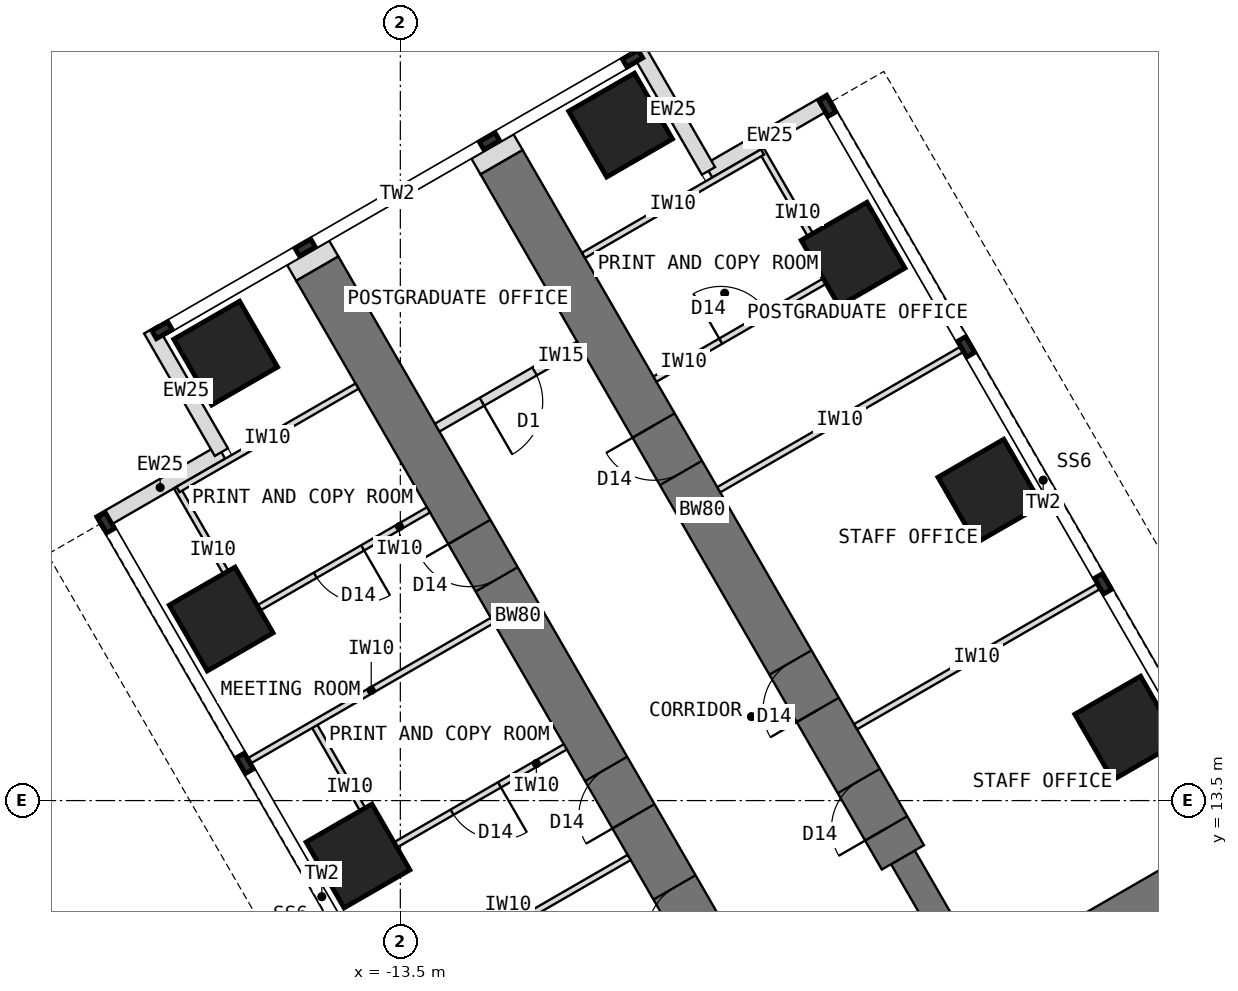
"""IFC4 building model, lengths in metres.
Left out: names, types, materials, properties, quantities, classifications, styles, units other than length and angle.
Written with IfcOpenShell. Run it as: python <this file> out.ifc"""

import sys

from ifc_helpers import new_model, si_unit, direction, frame, frame_2d, origin, origin_2d, place, context, subcontext, project, spatial, rectangle, extrude, element, fill, save


model = new_model("IFC4")
c1 = context("Model", 3, precision=1e-05, world=origin(), true_north=direction((0.0, 1.0)))
c2 = subcontext(c1, "Body", "Model", "MODEL_VIEW")
j1 = project(units=[si_unit("LENGTHUNIT", "METRE"), si_unit("PLANEANGLEUNIT", "RADIAN")], contexts=[c1])
p1 = place(None, origin())
s1 = spatial("IfcSite", under=j1, at=p1, CompositionType="ELEMENT")
p2 = place(p1, origin())
s2 = spatial("IfcBuilding", under=s1, at=p2, CompositionType="ELEMENT")
p3 = place(p2, frame((0.0, 0.0, 157.5)))
s3 = spatial("IfcBuildingStorey", under=s2, at=p3, CompositionType="ELEMENT", Elevation=157.5)
p4 = place(p3, frame((0.0, 12.596, 0.0), z_axis=(0.0, 0.0, 1.0), x_axis=(-0.866011268655, -0.500024481964, 0.0)))
e1 = element("IfcWall", 1, at=p4, inside=s3, PredefinedType="SHEAR", context=c2, shape_type="SweptSolid", body=[
    extrude(rectangle(XDim=4.548, YDim=0.6, at=frame_2d((2.274, 0.0))), origin(), (0.0, 0.0, 1.0), 4.0),
])
p5 = place(p3, frame((-8.266, 10.816, 0.0), z_axis=(0.0, 0.0, 1.0), x_axis=(-0.499996231654, 0.866027579429, 0.0)))
e2 = element("IfcWall", 2, at=p5, inside=s3, PredefinedType="SHEAR", context=c2, shape_type="SweptSolid", body=[
    extrude(rectangle(XDim=13.2, YDim=0.8, at=frame_2d((6.6, 0.0))), origin(), (0.0, 0.0, 1.0), 4.0),
])
p6 = place(p5, frame((0.55, 0.0, 0.0)))
e3 = element("IfcOpeningElement", 3, at=p6, cuts=e2, PredefinedType="OPENING", context=c2, shape_type="SweptSolid", body=[
    extrude(rectangle(XDim=0.9, YDim=2.1, at=frame_2d((0.45, 1.05))), frame((0.0, 0.41, 0.0), z_axis=(0.0, -1.0, 0.0), x_axis=(1.0, 0.0, 0.0)), (0.0, 0.0, 1.0), 0.82),
])
p7 = place(p5, frame((2.8, 0.0, 0.0)))
e4 = element("IfcOpeningElement", 4, at=p7, cuts=e2, PredefinedType="OPENING", context=c2, shape_type="SweptSolid", body=[
    extrude(rectangle(XDim=0.9, YDim=2.1, at=frame_2d((0.45, 1.05))), frame((0.0, 0.41, 0.0), z_axis=(0.0, -1.0, 0.0), x_axis=(1.0, 0.0, 0.0)), (0.0, 0.0, 1.0), 0.82),
])
p8 = place(p5, frame((7.3, 0.0, 0.0)))
e5 = element("IfcOpeningElement", 5, at=p8, cuts=e2, PredefinedType="OPENING", context=c2, shape_type="SweptSolid", body=[
    extrude(rectangle(XDim=0.9, YDim=2.1, at=frame_2d((0.45, 1.05))), frame((0.0, 0.41, 0.0), z_axis=(0.0, -1.0, 0.0), x_axis=(1.0, 0.0, 0.0)), (0.0, 0.0, 1.0), 0.82),
])
p9 = place(p3, frame((-3.939, 10.322, 0.0), z_axis=(0.0, 0.0, 1.0), x_axis=(-0.499918158782, 0.866072649678, 0.0)))
e6 = element("IfcWall", 6, at=p9, inside=s3, PredefinedType="SHEAR", context=c2, shape_type="SweptSolid", body=[
    extrude(rectangle(XDim=2.592, YDim=0.45, at=frame_2d((1.296, 0.0))), origin(), (0.0, 0.0, 1.0), 4.0),
])
p10 = place(p3, frame((-5.234, 12.566, 0.0), z_axis=(0.0, 0.0, 1.0), x_axis=(-0.500010103361, 0.866019570528, 0.0)))
e7 = element("IfcWall", 7, at=p10, inside=s3, PredefinedType="SHEAR", context=c2, shape_type="SweptSolid", body=[
    extrude(rectangle(XDim=13.2, YDim=0.8, at=frame_2d((6.6, 0.0))), origin(), (0.0, 0.0, 1.0), 4.0),
])
p11 = place(p10, frame((0.55, 0.0, 0.0)))
e8 = element("IfcOpeningElement", 8, at=p11, cuts=e7, PredefinedType="OPENING", context=c2, shape_type="SweptSolid", body=[
    extrude(rectangle(XDim=0.9, YDim=2.1, at=frame_2d((0.45, 1.05))), frame((0.0, 0.41, 0.0), z_axis=(0.0, -1.0, 0.0), x_axis=(1.0, 0.0, 0.0)), (0.0, 0.0, 1.0), 0.82),
])
p12 = place(p10, frame((2.8, 0.0, 0.0)))
e9 = element("IfcOpeningElement", 9, at=p12, cuts=e7, PredefinedType="OPENING", context=c2, shape_type="SweptSolid", body=[
    extrude(rectangle(XDim=0.9, YDim=2.1, at=frame_2d((0.45, 1.05))), frame((0.0, 0.41, 0.0), z_axis=(0.0, -1.0, 0.0), x_axis=(1.0, 0.0, 0.0)), (0.0, 0.0, 1.0), 0.82),
])
p13 = place(p10, frame((7.3, 0.0, 0.0)))
e10 = element("IfcOpeningElement", 10, at=p13, cuts=e7, PredefinedType="OPENING", context=c2, shape_type="SweptSolid", body=[
    extrude(rectangle(XDim=0.9, YDim=2.1, at=frame_2d((0.45, 1.05))), frame((0.0, 0.41, 0.0), z_axis=(0.0, -1.0, 0.0), x_axis=(1.0, 0.0, 0.0)), (0.0, 0.0, 1.0), 0.82),
])
for number, where, z_axis, x_axis in (
    (11, (-1.554, 14.691, 0.0), (0.0, 0.0, 1.0), (0.866, 0.5, 0.0)),
    (12, (-14.196, 12.588, 0.0), (0.0, 0.0, 1.0), (0.866, 0.5, 0.0)),
    (13, (-3.804, 18.588, 0.0), (0.0, 0.0, 1.0), (0.866, 0.5, 0.0)),
    (14, (-16.446, 16.486, 0.0), (0.0, 0.0, 1.0), (0.866, 0.5, 0.0)),
    (15, (-6.054, 22.486, 0.0), (0.0, 0.0, 1.0), (0.866, 0.5, 0.0)),
    (16, (-16.373, 20.858, 0.0), (0.0, 0.0, 1.0), (0.866, 0.5, 0.0)),
    (17, (-9.877, 24.608, 0.0), (0.0, 0.0, 1.0), (0.866, 0.5, 0.0)),
):
    element("IfcColumn", number, at=place(p3, frame(where, z_axis=z_axis, x_axis=x_axis)), inside=s3, PredefinedType="COLUMN", context=c2, shape_type="SweptSolid", body=[
        extrude(rectangle(XDim=1.25, YDim=1.25, at=origin_2d()), origin(), (0.0, 0.0, 1.0), 4.0),
    ])
for number, where, z_axis, x_axis in (
    (18, (-18.456, 18.067, 0.0), (0.0, 0.0, 1.0), (0.866, 0.5, 0.0)),
    (19, (-16.443, 19.23, 0.0), (0.0, 0.0, 1.0), (-0.5, 0.866, 0.0)),
    (20, (-6.419, 25.017, 0.0), (0.0, 0.0, 1.0), (-0.866, -0.5, 0.0)),
    (21, (-8.432, 23.855, 0.0), (0.0, 0.0, 1.0), (-0.5, 0.866, 0.0)),
):
    element("IfcWall", number, at=place(p3, frame(where, z_axis=z_axis, x_axis=x_axis)), inside=s3, PredefinedType="STANDARD", context=c2, shape_type="SweptSolid", body=[
        extrude(rectangle(XDim=2.325, YDim=0.25, at=frame_2d((1.163, 0.0))), origin(), (0.0, 0.0, 1.0), 3.8),
    ])
p14 = place(p3, frame((-14.865, 22.248, 0.0), z_axis=(0.0, 0.0, 1.0), x_axis=(-0.500426713919, 0.865778900179, 0.0)))
e22 = element("IfcWall", 22, at=p14, inside=s3, PredefinedType="PARTITIONING", context=c2, shape_type="SweptSolid", body=[
    extrude(rectangle(XDim=0.3, YDim=0.8, at=frame_2d((0.15, 0.0))), origin(), (0.0, 0.0, 1.0), 3.8),
])
p15 = place(p3, frame((-11.834, 23.998, 0.0), z_axis=(0.0, 0.0, 1.0), x_axis=(-0.499816412211, 0.866131372301, 0.0)))
e23 = element("IfcWall", 23, at=p15, inside=s3, PredefinedType="PARTITIONING", context=c2, shape_type="SweptSolid", body=[
    extrude(rectangle(XDim=0.3, YDim=0.8, at=frame_2d((0.15, 0.0))), origin(), (0.0, 0.0, 1.0), 3.8),
])
for number, where, z_axis, x_axis in (
    (24, (-9.737, 12.565, 0.0), (0.0, 0.0, 1.0), (-0.866, -0.5, 0.0)),
    (25, (-11.987, 16.462, 0.0), (0.0, 0.0, 1.0), (-0.866, -0.5, 0.0)),
):
    element("IfcWall", number, at=place(p3, frame(where, z_axis=z_axis, x_axis=x_axis)), inside=s3, PredefinedType="PARTITIONING", context=c2, shape_type="SweptSolid", body=[
        extrude(rectangle(XDim=4.6, YDim=0.1, at=frame_2d((2.3, 0.0))), origin(), (0.0, 0.0, 1.0), 3.8),
    ])
p16 = place(p3, frame((-13.731, 12.684, 0.0), z_axis=(0.0, 0.0, 1.0), x_axis=(-0.500001309137, 0.866024647952, 0.0)))
e26 = element("IfcWall", 26, at=p16, inside=s3, PredefinedType="PARTITIONING", context=c2, shape_type="SweptSolid", body=[
    extrude(rectangle(XDim=2.4, YDim=0.1, at=frame_2d((1.2, 0.0))), origin(), (0.0, 0.0, 1.0), 3.8),
])
p17 = place(p3, frame((-10.787, 14.384, 0.0), z_axis=(0.0, 0.0, 1.0), x_axis=(-0.866038511948, -0.499977295307, 0.0)))
e27 = element("IfcWall", 27, at=p17, inside=s3, PredefinedType="PARTITIONING", context=c2, shape_type="SweptSolid", body=[
    extrude(rectangle(XDim=3.4, YDim=0.1, at=frame_2d((1.7, 0.0))), origin(), (0.0, 0.0, 1.0), 3.8),
])
p18 = place(p17, frame((1.25, 0.0, 0.0)))
e28 = element("IfcOpeningElement", 28, at=p18, cuts=e27, PredefinedType="OPENING", context=c2, shape_type="SweptSolid", body=[
    extrude(rectangle(XDim=0.9, YDim=2.1, at=frame_2d((0.45, 1.05))), frame((0.0, 0.06, 0.0), z_axis=(0.0, -1.0, 0.0), x_axis=(1.0, 0.0, 0.0)), (0.0, 0.0, 1.0), 0.12),
])
p19 = place(p3, frame((-15.981, 16.581, 0.0), z_axis=(0.0, 0.0, 1.0), x_axis=(-0.499957262057, 0.866050077142, 0.0)))
e29 = element("IfcWall", 29, at=p19, inside=s3, PredefinedType="PARTITIONING", context=c2, shape_type="SweptSolid", body=[
    extrude(rectangle(XDim=2.4, YDim=0.1, at=frame_2d((1.2, 0.0))), origin(), (0.0, 0.0, 1.0), 3.8),
])
p20 = place(p3, frame((-13.037, 18.281, 0.0), z_axis=(0.0, 0.0, 1.0), x_axis=(-0.866007419912, -0.500031147688, 0.0)))
e30 = element("IfcWall", 30, at=p20, inside=s3, PredefinedType="PARTITIONING", context=c2, shape_type="SweptSolid", body=[
    extrude(rectangle(XDim=3.4, YDim=0.1, at=frame_2d((1.7, 0.0))), origin(), (0.0, 0.0, 1.0), 3.8),
])
p21 = place(p20, frame((1.25, 0.0, 0.0)))
e31 = element("IfcOpeningElement", 31, at=p21, cuts=e30, PredefinedType="OPENING", context=c2, shape_type="SweptSolid", body=[
    extrude(rectangle(XDim=0.9, YDim=2.1, at=frame_2d((0.45, 1.05))), frame((0.0, 0.06, 0.0), z_axis=(0.0, -1.0, 0.0), x_axis=(1.0, 0.0, 0.0)), (0.0, 0.0, 1.0), 0.12),
])
p22 = place(p3, frame((-14.212, 20.316, 0.0), z_axis=(0.0, 0.0, 1.0), x_axis=(-0.866007419912, -0.500031147688, 0.0)))
e32 = element("IfcWall", 32, at=p22, inside=s3, PredefinedType="PARTITIONING", context=c2, shape_type="SweptSolid", body=[
    extrude(rectangle(XDim=3.4, YDim=0.1, at=frame_2d((1.7, 0.0))), origin(), (0.0, 0.0, 1.0), 3.8),
])
for number, where, z_axis, x_axis in (
    (33, (-6.013, 14.715, 0.0), (0.0, 0.0, 1.0), (0.866, 0.5, 0.0)),
    (34, (-8.263, 18.612, 0.0), (0.0, 0.0, 1.0), (0.866, 0.5, 0.0)),
):
    element("IfcWall", number, at=place(p3, frame(where, z_axis=z_axis, x_axis=x_axis)), inside=s3, PredefinedType="PARTITIONING", context=c2, shape_type="SweptSolid", body=[
        extrude(rectangle(XDim=4.6, YDim=0.1, at=frame_2d((2.3, 0.0))), origin(), (0.0, 0.0, 1.0), 3.8),
    ])
p23 = place(p3, frame((-6.369, 22.131, 0.0), z_axis=(0.0, 0.0, 1.0), x_axis=(-0.499957262057, 0.866050077142, 0.0)))
e35 = element("IfcWall", 35, at=p23, inside=s3, PredefinedType="PARTITIONING", context=c2, shape_type="SweptSolid", body=[
    extrude(rectangle(XDim=2.4, YDim=0.1, at=frame_2d((1.2, 0.0))), origin(), (0.0, 0.0, 1.0), 3.8),
])
p24 = place(p3, frame((-9.313, 20.431, 0.0), z_axis=(0.0, 0.0, 1.0), x_axis=(0.866020560687, 0.500008388397, 0.0)))
e36 = element("IfcWall", 36, at=p24, inside=s3, PredefinedType="PARTITIONING", context=c2, shape_type="SweptSolid", body=[
    extrude(rectangle(XDim=3.4, YDim=0.1, at=frame_2d((1.7, 0.0))), origin(), (0.0, 0.0, 1.0), 3.8),
])
p25 = place(p24, frame((1.25, 0.0, 0.0)))
e37 = element("IfcOpeningElement", 37, at=p25, cuts=e36, PredefinedType="OPENING", context=c2, shape_type="SweptSolid", body=[
    extrude(rectangle(XDim=0.9, YDim=2.1, at=frame_2d((0.45, 1.05))), frame((0.0, 0.06, 0.0), z_axis=(0.0, -1.0, 0.0), x_axis=(1.0, 0.0, 0.0)), (0.0, 0.0, 1.0), 0.12),
])
p26 = place(p3, frame((-10.488, 22.466, 0.0), z_axis=(0.0, 0.0, 1.0), x_axis=(0.866038511948, 0.499977295307, 0.0)))
e38 = element("IfcWall", 38, at=p26, inside=s3, PredefinedType="PARTITIONING", context=c2, shape_type="SweptSolid", body=[
    extrude(rectangle(XDim=3.4, YDim=0.1, at=frame_2d((1.7, 0.0))), origin(), (0.0, 0.0, 1.0), 3.8),
])
p27 = place(p3, frame((-10.556, 20.983, 0.0), z_axis=(0.0, 0.0, 1.0), x_axis=(-0.86599734893, -0.500048589285, 0.0)))
e39 = element("IfcWall", 39, at=p27, inside=s3, PredefinedType="PARTITIONING", context=c2, shape_type="SweptSolid", body=[
    extrude(rectangle(XDim=2.7, YDim=0.15, at=frame_2d((1.35, 0.0))), origin(), (0.0, 0.0, 1.0), 3.8),
])
p28 = place(p27, frame((0.85, 0.0, 0.0)))
e40 = element("IfcOpeningElement", 40, at=p28, cuts=e39, PredefinedType="OPENING", context=c2, shape_type="SweptSolid", body=[
    extrude(rectangle(XDim=1.0, YDim=2.1, at=frame_2d((0.5, 1.05))), frame((0.0, 0.085, 0.0), z_axis=(0.0, -1.0, 0.0), x_axis=(1.0, 0.0, 0.0)), (0.0, 0.0, 1.0), 0.17),
])
p29 = place(p18, origin())
e41 = element("IfcDoor", 41, at=p29, inside=s3, OperationType="SINGLE_SWING_LEFT", PredefinedType="DOOR", context=c2, shape_type="SweptSolid", body=[
    extrude(rectangle(XDim=0.9, YDim=2.1, at=frame_2d((0.45, 1.05))), frame((0.0, 0.025, 0.0), z_axis=(0.0, -1.0, 0.0), x_axis=(1.0, 0.0, 0.0)), (0.0, 0.0, 1.0), 0.05),
])
fill(e28, e41)
p30 = place(p21, origin())
e42 = element("IfcDoor", 42, at=p30, inside=s3, OperationType="SINGLE_SWING_LEFT", PredefinedType="DOOR", context=c2, shape_type="SweptSolid", body=[
    extrude(rectangle(XDim=0.9, YDim=2.1, at=frame_2d((0.45, 1.05))), frame((0.0, 0.025, 0.0), z_axis=(0.0, -1.0, 0.0), x_axis=(1.0, 0.0, 0.0)), (0.0, 0.0, 1.0), 0.05),
])
fill(e31, e42)
p31 = place(p25, origin())
e43 = element("IfcDoor", 43, at=p31, inside=s3, OperationType="SINGLE_SWING_LEFT", PredefinedType="DOOR", context=c2, shape_type="SweptSolid", body=[
    extrude(rectangle(XDim=0.9, YDim=2.1, at=frame_2d((0.45, 1.05))), frame((0.0, 0.025, 0.0), z_axis=(0.0, -1.0, 0.0), x_axis=(1.0, 0.0, 0.0)), (0.0, 0.0, 1.0), 0.05),
])
fill(e37, e43)
p32 = place(p28, origin())
e44 = element("IfcDoor", 44, at=p32, inside=s3, OperationType="SINGLE_SWING_RIGHT", PredefinedType="DOOR", context=c2, shape_type="SweptSolid", body=[
    extrude(rectangle(XDim=1.0, YDim=2.1, at=frame_2d((0.5, 1.05))), frame((0.0, 0.025, 0.0), z_axis=(0.0, -1.0, 0.0), x_axis=(1.0, 0.0, 0.0)), (0.0, 0.0, 1.0), 0.05),
])
fill(e40, e44)
p33 = place(p6, origin())
e45 = element("IfcDoor", 45, at=p33, inside=s3, OperationType="SINGLE_SWING_LEFT", PredefinedType="DOOR", context=c2, shape_type="SweptSolid", body=[
    extrude(rectangle(XDim=0.82, YDim=2.06, at=frame_2d((0.45, 1.03))), frame((0.0, 0.025, 0.0), z_axis=(0.0, -1.0, 0.0), x_axis=(1.0, 0.0, 0.0)), (0.0, 0.0, 1.0), 0.05),
    extrude(rectangle(XDim=0.04, YDim=2.1, at=frame_2d((0.02, 1.05))), frame((0.0, 0.4, 0.0), z_axis=(0.0, -1.0, 0.0), x_axis=(1.0, 0.0, 0.0)), (0.0, 0.0, 1.0), 0.8),
    extrude(rectangle(XDim=0.04, YDim=2.1, at=frame_2d((0.88, 1.05))), frame((0.0, 0.4, 0.0), z_axis=(0.0, -1.0, 0.0), x_axis=(1.0, 0.0, 0.0)), (0.0, 0.0, 1.0), 0.8),
    extrude(rectangle(XDim=0.82, YDim=0.04, at=frame_2d((0.45, 2.08))), frame((0.0, 0.4, 0.0), z_axis=(0.0, -1.0, 0.0), x_axis=(1.0, 0.0, 0.0)), (0.0, 0.0, 1.0), 0.8),
])
fill(e3, e45)
p34 = place(p7, origin())
e46 = element("IfcDoor", 46, at=p34, inside=s3, OperationType="SINGLE_SWING_LEFT", PredefinedType="DOOR", context=c2, shape_type="SweptSolid", body=[
    extrude(rectangle(XDim=0.82, YDim=2.06, at=frame_2d((0.45, 1.03))), frame((0.0, 0.025, 0.0), z_axis=(0.0, -1.0, 0.0), x_axis=(1.0, 0.0, 0.0)), (0.0, 0.0, 1.0), 0.05),
    extrude(rectangle(XDim=0.04, YDim=2.1, at=frame_2d((0.02, 1.05))), frame((0.0, 0.4, 0.0), z_axis=(0.0, -1.0, 0.0), x_axis=(1.0, 0.0, 0.0)), (0.0, 0.0, 1.0), 0.8),
    extrude(rectangle(XDim=0.04, YDim=2.1, at=frame_2d((0.88, 1.05))), frame((0.0, 0.4, 0.0), z_axis=(0.0, -1.0, 0.0), x_axis=(1.0, 0.0, 0.0)), (0.0, 0.0, 1.0), 0.8),
    extrude(rectangle(XDim=0.82, YDim=0.04, at=frame_2d((0.45, 2.08))), frame((0.0, 0.4, 0.0), z_axis=(0.0, -1.0, 0.0), x_axis=(1.0, 0.0, 0.0)), (0.0, 0.0, 1.0), 0.8),
])
fill(e4, e46)
p35 = place(p8, origin())
e47 = element("IfcDoor", 47, at=p35, inside=s3, OperationType="SINGLE_SWING_RIGHT", PredefinedType="DOOR", context=c2, shape_type="SweptSolid", body=[
    extrude(rectangle(XDim=0.82, YDim=2.06, at=frame_2d((0.45, 1.03))), frame((0.0, 0.025, 0.0), z_axis=(0.0, -1.0, 0.0), x_axis=(1.0, 0.0, 0.0)), (0.0, 0.0, 1.0), 0.05),
    extrude(rectangle(XDim=0.04, YDim=2.1, at=frame_2d((0.02, 1.05))), frame((0.0, 0.4, 0.0), z_axis=(0.0, -1.0, 0.0), x_axis=(1.0, 0.0, 0.0)), (0.0, 0.0, 1.0), 0.8),
    extrude(rectangle(XDim=0.04, YDim=2.1, at=frame_2d((0.88, 1.05))), frame((0.0, 0.4, 0.0), z_axis=(0.0, -1.0, 0.0), x_axis=(1.0, 0.0, 0.0)), (0.0, 0.0, 1.0), 0.8),
    extrude(rectangle(XDim=0.82, YDim=0.04, at=frame_2d((0.45, 2.08))), frame((0.0, 0.4, 0.0), z_axis=(0.0, -1.0, 0.0), x_axis=(1.0, 0.0, 0.0)), (0.0, 0.0, 1.0), 0.8),
])
fill(e5, e47)
p36 = place(p11, origin())
e48 = element("IfcDoor", 48, at=p36, inside=s3, OperationType="SINGLE_SWING_LEFT", PredefinedType="DOOR", context=c2, shape_type="SweptSolid", body=[
    extrude(rectangle(XDim=0.82, YDim=2.06, at=frame_2d((0.45, 1.03))), frame((0.0, 0.025, 0.0), z_axis=(0.0, -1.0, 0.0), x_axis=(1.0, 0.0, 0.0)), (0.0, 0.0, 1.0), 0.05),
    extrude(rectangle(XDim=0.04, YDim=2.1, at=frame_2d((0.02, 1.05))), frame((0.0, 0.4, 0.0), z_axis=(0.0, -1.0, 0.0), x_axis=(1.0, 0.0, 0.0)), (0.0, 0.0, 1.0), 0.8),
    extrude(rectangle(XDim=0.04, YDim=2.1, at=frame_2d((0.88, 1.05))), frame((0.0, 0.4, 0.0), z_axis=(0.0, -1.0, 0.0), x_axis=(1.0, 0.0, 0.0)), (0.0, 0.0, 1.0), 0.8),
    extrude(rectangle(XDim=0.82, YDim=0.04, at=frame_2d((0.45, 2.08))), frame((0.0, 0.4, 0.0), z_axis=(0.0, -1.0, 0.0), x_axis=(1.0, 0.0, 0.0)), (0.0, 0.0, 1.0), 0.8),
])
fill(e8, e48)
p37 = place(p12, origin())
e49 = element("IfcDoor", 49, at=p37, inside=s3, OperationType="SINGLE_SWING_LEFT", PredefinedType="DOOR", context=c2, shape_type="SweptSolid", body=[
    extrude(rectangle(XDim=0.82, YDim=2.06, at=frame_2d((0.45, 1.03))), frame((0.0, 0.025, 0.0), z_axis=(0.0, -1.0, 0.0), x_axis=(1.0, 0.0, 0.0)), (0.0, 0.0, 1.0), 0.05),
    extrude(rectangle(XDim=0.04, YDim=2.1, at=frame_2d((0.02, 1.05))), frame((0.0, 0.4, 0.0), z_axis=(0.0, -1.0, 0.0), x_axis=(1.0, 0.0, 0.0)), (0.0, 0.0, 1.0), 0.8),
    extrude(rectangle(XDim=0.04, YDim=2.1, at=frame_2d((0.88, 1.05))), frame((0.0, 0.4, 0.0), z_axis=(0.0, -1.0, 0.0), x_axis=(1.0, 0.0, 0.0)), (0.0, 0.0, 1.0), 0.8),
    extrude(rectangle(XDim=0.82, YDim=0.04, at=frame_2d((0.45, 2.08))), frame((0.0, 0.4, 0.0), z_axis=(0.0, -1.0, 0.0), x_axis=(1.0, 0.0, 0.0)), (0.0, 0.0, 1.0), 0.8),
])
fill(e9, e49)
p38 = place(p13, origin())
e50 = element("IfcDoor", 50, at=p38, inside=s3, OperationType="SINGLE_SWING_RIGHT", PredefinedType="DOOR", context=c2, shape_type="SweptSolid", body=[
    extrude(rectangle(XDim=0.82, YDim=2.06, at=frame_2d((0.45, 1.03))), frame((0.0, 0.025, 0.0), z_axis=(0.0, -1.0, 0.0), x_axis=(1.0, 0.0, 0.0)), (0.0, 0.0, 1.0), 0.05),
    extrude(rectangle(XDim=0.04, YDim=2.1, at=frame_2d((0.02, 1.05))), frame((0.0, 0.4, 0.0), z_axis=(0.0, -1.0, 0.0), x_axis=(1.0, 0.0, 0.0)), (0.0, 0.0, 1.0), 0.8),
    extrude(rectangle(XDim=0.04, YDim=2.1, at=frame_2d((0.88, 1.05))), frame((0.0, 0.4, 0.0), z_axis=(0.0, -1.0, 0.0), x_axis=(1.0, 0.0, 0.0)), (0.0, 0.0, 1.0), 0.8),
    extrude(rectangle(XDim=0.82, YDim=0.04, at=frame_2d((0.45, 2.08))), frame((0.0, 0.4, 0.0), z_axis=(0.0, -1.0, 0.0), x_axis=(1.0, 0.0, 0.0)), (0.0, 0.0, 1.0), 0.8),
])
fill(e10, e50)
save(model, sys.argv[1])
